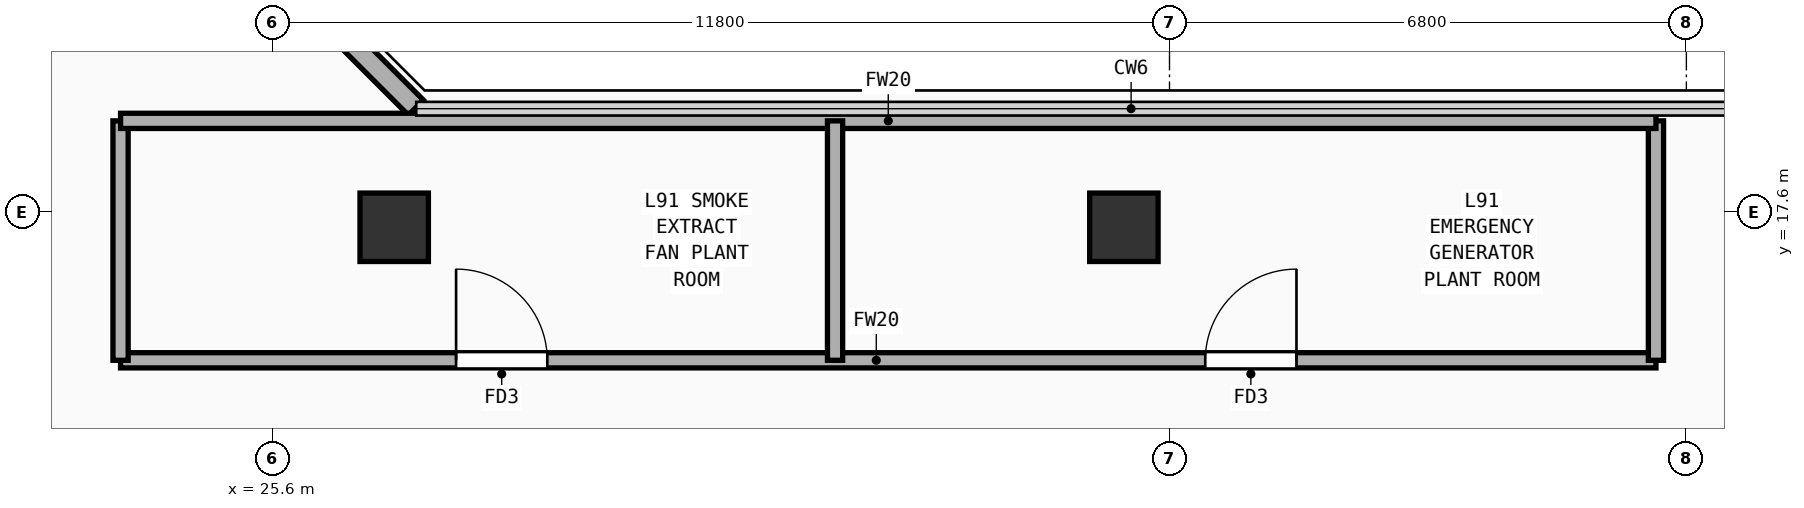
"""IFC4 building model, lengths in metres.
Left out: names, types, materials, properties, quantities, classifications, styles, units other than length and angle.
Written with IfcOpenShell. Run it as: python <this file> out.ifc"""

import sys

from ifc_helpers import new_model, si_unit, direction, frame, frame_2d, origin, origin_2d, place, context, subcontext, project, spatial, rectangle, extrude, element, fill, save


model = new_model("IFC4")
c1 = context("Model", 3, precision=1e-05, world=origin(), true_north=direction((0.0, 1.0)))
c2 = subcontext(c1, "Body", "Model", "MODEL_VIEW")
j1 = project(units=[si_unit("LENGTHUNIT", "METRE"), si_unit("PLANEANGLEUNIT", "RADIAN")], contexts=[c1])
p1 = place(None, origin())
s1 = spatial("IfcSite", under=j1, at=p1, CompositionType="ELEMENT")
p2 = place(p1, origin())
s2 = spatial("IfcBuilding", under=s1, at=p2, CompositionType="ELEMENT")
p3 = place(p2, frame((0.0, 0.0, 356.2)))
s3 = spatial("IfcBuildingStorey", under=s2, at=p3, CompositionType="ELEMENT", Elevation=356.2)
for number, where, z_axis, x_axis in (
    (1, (27.2, 17.4, 0.0), (0.0, 0.0, 1.0), (1.0, 0.0, 0.0)),
    (2, (36.8, 17.4, 0.0), (0.0, 0.0, 1.0), (1.0, 0.0, 0.0)),
):
    element("IfcColumn", number, at=place(p3, frame(where, z_axis=z_axis, x_axis=x_axis)), inside=s3, PredefinedType="COLUMN", context=c2, shape_type="SweptSolid", body=[
        extrude(rectangle(XDim=0.9, YDim=0.9, at=origin_2d()), origin(), (0.0, 0.0, 1.0), 3.82),
    ])
p4 = place(p3, frame((27.485, 18.975, 0.0), z_axis=(0.0, 0.0, 1.0), x_axis=(-0.707106781187, 0.707106781187, 0.0)))
e3 = element("IfcWall", 3, at=p4, inside=s3, PredefinedType="SOLIDWALL", context=c2, shape_type="SweptSolid", body=[
    extrude(rectangle(XDim=9.207, YDim=0.28, at=frame_2d((4.603, 0.0))), origin(), (0.0, 0.0, 1.0), 3.82),
])
p5 = place(p3, frame((23.6, 15.65, 0.0), z_axis=(0.0, 0.0, 1.0), x_axis=(1.0, 0.0, 0.0)))
e4 = element("IfcWall", 4, at=p5, inside=s3, PredefinedType="PARTITIONING", context=c2, shape_type="SweptSolid", body=[
    extrude(rectangle(XDim=20.2, YDim=0.2, at=frame_2d((10.1, 0.0))), origin(), (0.0, 0.0, 1.0), 3.52),
])
p6 = place(p5, frame((4.414, 0.0, 0.0)))
e5 = element("IfcOpeningElement", 5, at=p6, cuts=e4, PredefinedType="OPENING", context=c2, shape_type="SweptSolid", body=[
    extrude(rectangle(XDim=1.2, YDim=2.25, at=frame_2d((0.6, 1.125))), frame((0.0, 0.11, 0.0), z_axis=(0.0, -1.0, 0.0), x_axis=(1.0, 0.0, 0.0)), (0.0, 0.0, 1.0), 0.22),
])
p7 = place(p5, frame((14.271, 0.0, 0.0)))
e6 = element("IfcOpeningElement", 6, at=p7, cuts=e4, PredefinedType="OPENING", context=c2, shape_type="SweptSolid", body=[
    extrude(rectangle(XDim=1.2, YDim=2.25, at=frame_2d((0.6, 1.125))), frame((0.0, 0.11, 0.0), z_axis=(0.0, -1.0, 0.0), x_axis=(1.0, 0.0, 0.0)), (0.0, 0.0, 1.0), 0.22),
])
for number, where, z_axis, x_axis in (
    (7, (23.6, 15.65, 0.0), (0.0, 0.0, 1.0), (0.0, 1.0, 0.0)),
    (8, (43.8, 15.65, 0.0), (0.0, 0.0, 1.0), (0.0, 1.0, 0.0)),
):
    element("IfcWall", number, at=place(p3, frame(where, z_axis=z_axis, x_axis=x_axis)), inside=s3, PredefinedType="PARTITIONING", context=c2, shape_type="SweptSolid", body=[
        extrude(rectangle(XDim=3.15, YDim=0.2, at=frame_2d((1.575, 0.0))), origin(), (0.0, 0.0, 1.0), 3.82),
    ])
p8 = place(p3, frame((23.6, 18.8, 0.0), z_axis=(0.0, 0.0, 1.0), x_axis=(1.0, 0.0, 0.0)))
e9 = element("IfcWall", 9, at=p8, inside=s3, PredefinedType="PARTITIONING", context=c2, shape_type="SweptSolid", body=[
    extrude(rectangle(XDim=20.2, YDim=0.2, at=frame_2d((10.1, 0.0))), origin(), (0.0, 0.0, 1.0), 3.82),
])
p9 = place(p3, frame((33.0, 15.65, 0.0), z_axis=(0.0, 0.0, 1.0), x_axis=(0.0, 1.0, 0.0)))
e10 = element("IfcWall", 10, at=p9, inside=s3, PredefinedType="PARTITIONING", context=c2, shape_type="SweptSolid", body=[
    extrude(rectangle(XDim=3.15, YDim=0.2, at=frame_2d((1.575, 0.0))), origin(), (0.0, 0.0, 1.0), 3.82),
])
p10 = place(p6, origin())
e11 = element("IfcDoor", 11, at=p10, inside=s3, OperationType="SINGLE_SWING_LEFT", PredefinedType="DOOR", context=c2, shape_type="SweptSolid", body=[
    extrude(rectangle(XDim=1.2, YDim=2.25, at=frame_2d((0.6, 1.125))), frame((0.0, 0.025, 0.0), z_axis=(0.0, -1.0, 0.0), x_axis=(1.0, 0.0, 0.0)), (0.0, 0.0, 1.0), 0.05),
])
fill(e5, e11)
p11 = place(p7, origin())
e12 = element("IfcDoor", 12, at=p11, inside=s3, OperationType="SINGLE_SWING_RIGHT", PredefinedType="DOOR", context=c2, shape_type="SweptSolid", body=[
    extrude(rectangle(XDim=1.2, YDim=2.25, at=frame_2d((0.6, 1.125))), frame((0.0, 0.025, 0.0), z_axis=(0.0, -1.0, 0.0), x_axis=(1.0, 0.0, 0.0)), (0.0, 0.0, 1.0), 0.05),
])
fill(e6, e12)
save(model, sys.argv[1])
